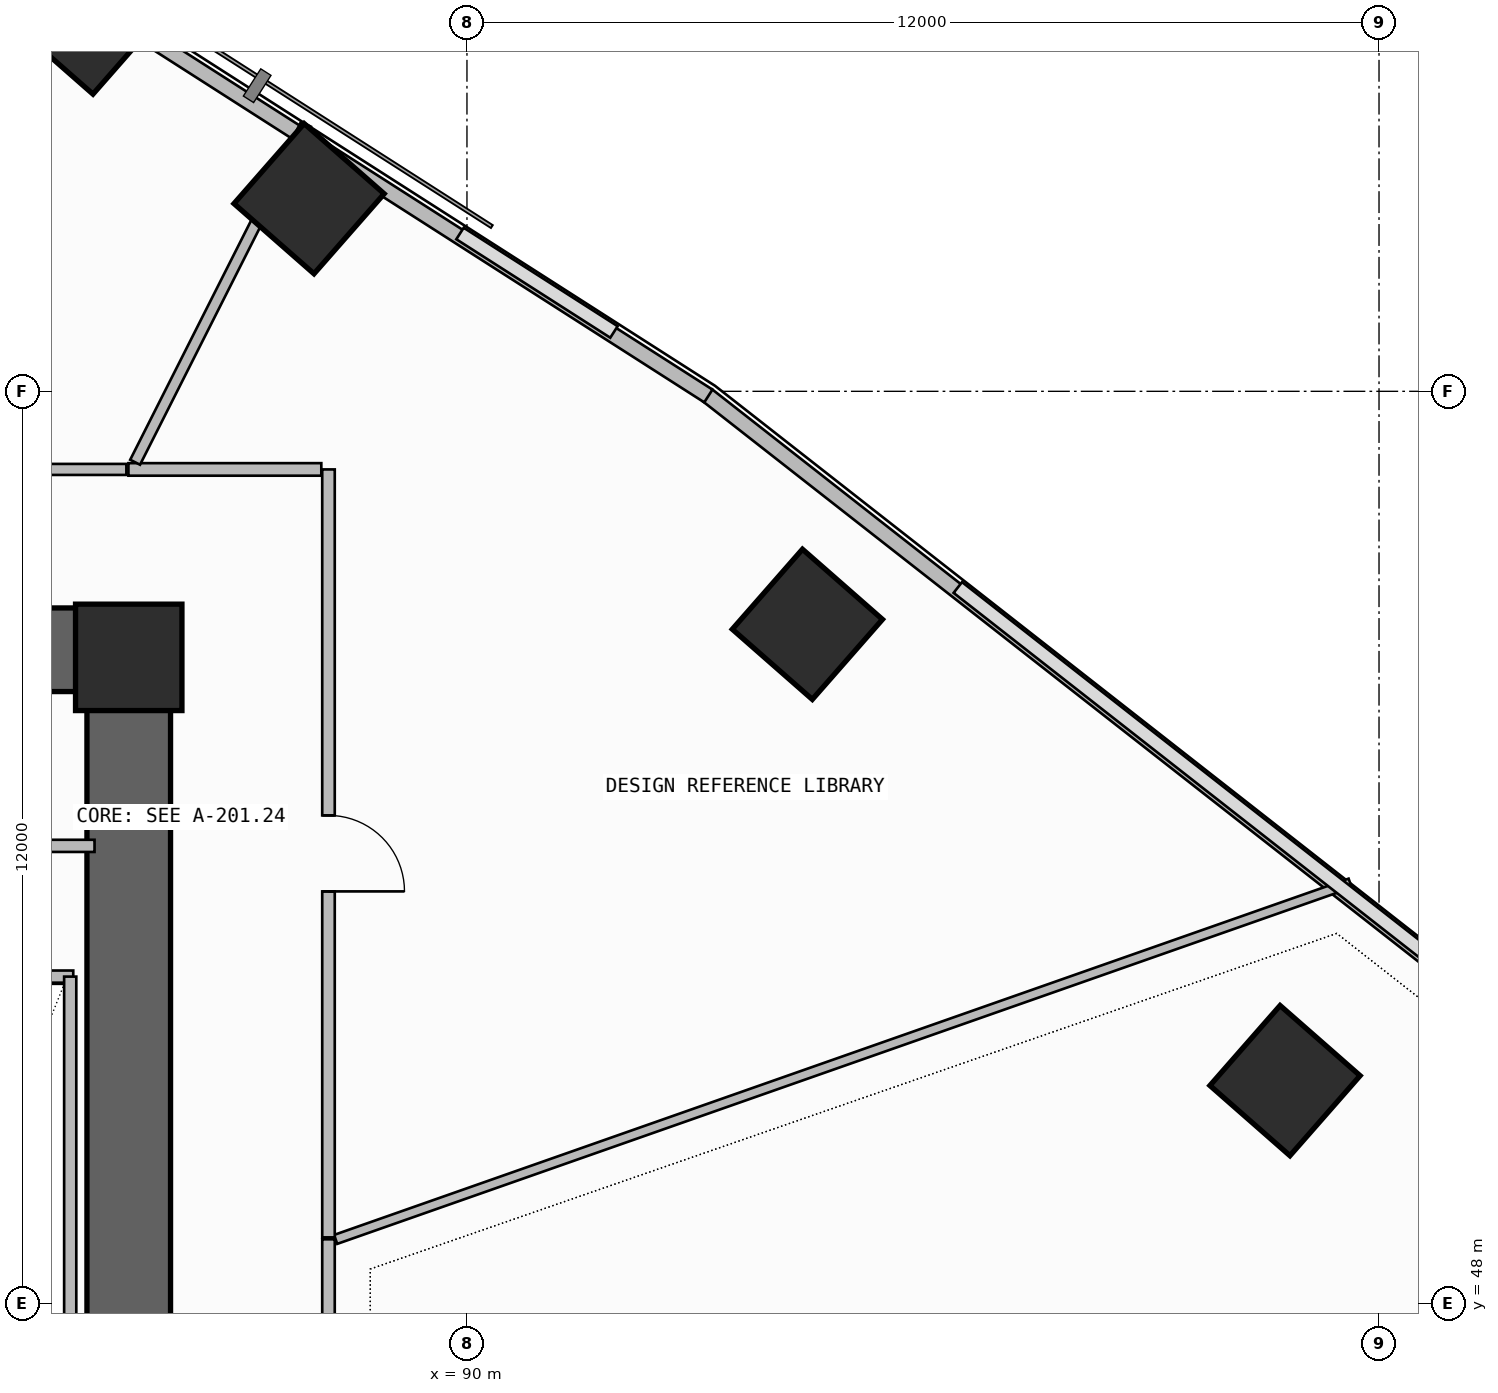
"""IFC4 building model, lengths in metres.
Left out: names, types, materials, properties, quantities, classifications, styles, units other than length and angle.
Written with IfcOpenShell. Run it as: python <this file> out.ifc"""

import sys

from ifc_helpers import new_model, si_unit, direction, frame, frame_2d, origin, origin_2d, place, context, subcontext, project, spatial, rectangle, extrude, element, fill, save


model = new_model("IFC4")
c1 = context("Model", 3, precision=1e-05, world=origin(), true_north=direction((0.0, 1.0)))
c2 = subcontext(c1, "Body", "Model", "MODEL_VIEW")
j1 = project(units=[si_unit("LENGTHUNIT", "METRE"), si_unit("PLANEANGLEUNIT", "RADIAN")], contexts=[c1])
p1 = place(None, origin())
s1 = spatial("IfcSite", under=j1, at=p1, CompositionType="ELEMENT")
p2 = place(p1, origin())
s2 = spatial("IfcBuilding", under=s1, at=p2, CompositionType="ELEMENT")
p3 = place(p2, frame((0.0, 0.0, 84.9)))
s3 = spatial("IfcBuildingStorey", under=s2, at=p3, CompositionType="ELEMENT", Elevation=84.9)
p4 = place(p3, frame((71.8, 56.6, -0.26), z_axis=(0.0, 0.0, 1.0), x_axis=(1.0, 0.0, 0.0)))
e1 = element("IfcWall", 1, at=p4, inside=s3, PredefinedType="SHEAR", context=c2, shape_type="SweptSolid", body=[
    extrude(rectangle(XDim=14.3, YDim=1.1, at=frame_2d((7.15, 0.0))), origin(), (0.0, 0.0, 1.0), 3.6),
])
p5 = place(p3, frame((85.55, 47.6, -0.26), z_axis=(0.0, 0.0, 1.0), x_axis=(0.0, 1.0, 0.0)))
e2 = element("IfcWall", 2, at=p5, inside=s3, PredefinedType="SHEAR", context=c2, shape_type="SweptSolid", body=[
    extrude(rectangle(XDim=8.45, YDim=1.1, at=frame_2d((4.225, 0.0))), origin(), (0.0, 0.0, 1.0), 3.6),
])
for number, where, z_axis, x_axis in (
    (3, (85.55, 56.5, 0.0), (0.0, 0.0, 1.0), (1.0, 0.0, 0.0)),
    (4, (100.763, 50.932, 0.0), (0.0, 0.0, 1.0), (0.659, 0.752, 0.0)),
    (5, (94.479, 56.935, 0.0), (0.0, 0.0, 1.0), (0.659, 0.752, 0.0)),
    (6, (87.923, 62.534, 0.0), (0.0, 0.0, 1.0), (0.659, 0.752, 0.0)),
    (7, (85.015, 64.898, 0.0), (0.0, 0.0, 1.0), (0.659, 0.752, 0.0)),
):
    element("IfcColumn", number, at=place(p3, frame(where, z_axis=z_axis, x_axis=x_axis)), inside=s3, PredefinedType="COLUMN", context=c2, shape_type="SweptSolid", body=[
        extrude(rectangle(XDim=1.4, YDim=1.4, at=origin_2d()), origin(), (0.0, 0.0, 1.0), 3.6),
    ])
p6 = place(p3, frame((121.476, 37.781, 0.0), z_axis=(0.0, 0.0, 1.0), x_axis=(-0.787385636484, 0.61646075257, 0.0)))
e8 = element("IfcWall", 8, at=p6, inside=s3, PredefinedType="PARAPET", context=c2, shape_type="SweptSolid", body=[
    extrude(rectangle(XDim=35.957, YDim=0.2, at=frame_2d((17.979, 0.0))), origin(), (0.0, 0.0, 1.0), 1.15),
])
p7 = place(p3, frame((93.176, 59.939, 0.0), z_axis=(0.0, 0.0, 1.0), x_axis=(-0.842413081081, 0.538832256666, 0.0)))
e9 = element("IfcWall", 9, at=p7, inside=s3, PredefinedType="PARAPET", context=c2, shape_type="SweptSolid", body=[
    extrude(rectangle(XDim=9.011, YDim=0.2, at=frame_2d((4.505, 0.0))), origin(), (0.0, 0.0, 1.0), 1.15),
])
p8 = place(p3, frame((80.6, 52.3, 0.0), z_axis=(0.0, 0.0, 1.0), x_axis=(1.0, 0.0, 0.0)))
e10 = element("IfcWall", 10, at=p8, inside=s3, PredefinedType="SOLIDWALL", context=c2, shape_type="SweptSolid", body=[
    extrude(rectangle(XDim=4.22, YDim=0.16, at=frame_2d((2.11, 0.0))), origin(), (0.0, 0.0, 1.0), 3.34),
])
p9 = place(p3, frame((84.78, 47.7, 0.0), z_axis=(0.0, 0.0, 1.0), x_axis=(0.0, 1.0, 0.0)))
e11 = element("IfcWall", 11, at=p9, inside=s3, PredefinedType="SOLIDWALL", context=c2, shape_type="SweptSolid", body=[
    extrude(rectangle(XDim=4.6, YDim=0.16, at=frame_2d((2.3, 0.0))), origin(), (0.0, 0.0, 1.0), 3.34),
])
p10 = place(p3, frame((73.02, 54.02, 0.0), z_axis=(0.0, 0.0, 1.0), x_axis=(1.0, 0.0, 0.0)))
e12 = element("IfcWall", 12, at=p10, inside=s3, PredefinedType="SOLIDWALL", context=c2, shape_type="SweptSolid", body=[
    extrude(rectangle(XDim=12.08, YDim=0.16, at=frame_2d((6.04, 0.0))), origin(), (0.0, 0.0, 1.0), 3.34),
])
p11 = place(p3, frame((88.178, 43.347, 0.0), z_axis=(0.0, 0.0, 1.0), x_axis=(0.0, 1.0, 0.0)))
e13 = element("IfcWall", 13, at=p11, inside=s3, PredefinedType="PARTITIONING", context=c2, shape_type="SweptSolid", body=[
    extrude(rectangle(XDim=5.497, YDim=0.165, at=frame_2d((2.748, 0.0))), origin(), (0.0, 0.0, 1.0), 2.725),
])
p12 = place(p11, frame((2.248, 0.0, 0.0)))
e14 = element("IfcOpeningElement", 14, at=p12, cuts=e13, PredefinedType="OPENING", context=c2, shape_type="SweptSolid", body=[
    extrude(rectangle(XDim=1.0, YDim=2.2, at=frame_2d((0.5, 1.1))), frame((0.0, 0.093, 0.0), z_axis=(0.0, -1.0, 0.0), x_axis=(1.0, 0.0, 0.0)), (0.0, 0.0, 1.0), 0.185),
])
p13 = place(p3, frame((88.273, 48.843, 0.0), z_axis=(0.0, 0.0, 1.0), x_axis=(0.943516431549, 0.331325736091, 0.0)))
e15 = element("IfcWall", 15, at=p13, inside=s3, PredefinedType="PARTITIONING", context=c2, shape_type="SweptSolid", body=[
    extrude(rectangle(XDim=14.147, YDim=0.125, at=frame_2d((7.073, 0.0))), origin(), (0.0, 0.0, 1.0), 2.725),
])
p14 = place(p3, frame((88.178, 48.869, 0.0), z_axis=(0.0, 0.0, 1.0), x_axis=(0.0, 1.0, 0.0)))
e16 = element("IfcWall", 16, at=p14, inside=s3, PredefinedType="PARTITIONING", context=c2, shape_type="SweptSolid", body=[
    extrude(rectangle(XDim=10.103, YDim=0.165, at=frame_2d((5.052, 0.0))), origin(), (0.0, 0.0, 1.0), 2.725),
])
p15 = place(p14, frame((4.552, 0.0, 0.0)))
e17 = element("IfcOpeningElement", 17, at=p15, cuts=e16, PredefinedType="OPENING", context=c2, shape_type="SweptSolid", body=[
    extrude(rectangle(XDim=1.0, YDim=2.2, at=frame_2d((0.5, 1.1))), frame((0.0, 0.093, 0.0), z_axis=(0.0, -1.0, 0.0), x_axis=(1.0, 0.0, 0.0)), (0.0, 0.0, 1.0), 0.185),
])
p16 = place(p3, frame((88.083, 58.972, 0.0), z_axis=(0.0, 0.0, 1.0), x_axis=(-1.0, 0.0, 0.0)))
e18 = element("IfcWall", 18, at=p16, inside=s3, PredefinedType="PARTITIONING", context=c2, shape_type="SweptSolid", body=[
    extrude(rectangle(XDim=2.538, YDim=0.165, at=frame_2d((1.269, 0.0))), origin(), (0.0, 0.0, 1.0), 2.725),
])
p17 = place(p3, frame((85.634, 59.067, 0.0), z_axis=(0.0, 0.0, 1.0), x_axis=(0.451108601362, 0.892469063765, 0.0)))
e19 = element("IfcWall", 19, at=p17, inside=s3, PredefinedType="PARTITIONING", context=c2, shape_type="SweptSolid", body=[
    extrude(rectangle(XDim=4.984, YDim=0.145, at=frame_2d((2.492, 0.0))), origin(), (0.0, 0.0, 1.0), 2.725),
])
p18 = place(p3, frame((85.519, 58.972, 0.0), z_axis=(0.0, 0.0, 1.0), x_axis=(-1.0, 0.0, 0.0)))
e20 = element("IfcWall", 20, at=p18, inside=s3, PredefinedType="PARTITIONING", context=c2, shape_type="SweptSolid", body=[
    extrude(rectangle(XDim=6.334, YDim=0.145, at=frame_2d((3.167, 0.0))), origin(), (0.0, 0.0, 1.0), 2.725),
])
p19 = place(p18, frame((2.717, 0.0, 0.0)))
e21 = element("IfcOpeningElement", 21, at=p19, cuts=e20, PredefinedType="OPENING", context=c2, shape_type="SweptSolid", body=[
    extrude(rectangle(XDim=0.9, YDim=2.1, at=frame_2d((0.45, 1.05))), frame((0.0, 0.083, 0.0), z_axis=(0.0, -1.0, 0.0), x_axis=(1.0, 0.0, 0.0)), (0.0, 0.0, 1.0), 0.165),
])
p20 = place(p15, frame((1.0, 0.0, 0.0), z_axis=(0.0, 0.0, 1.0), x_axis=(-1.0, 0.0, 0.0)))
e22 = element("IfcDoor", 22, at=p20, inside=s3, OperationType="SINGLE_SWING_RIGHT", PredefinedType="DOOR", context=c2, shape_type="SweptSolid", body=[
    extrude(rectangle(XDim=1.0, YDim=2.2, at=frame_2d((0.5, 1.1))), frame((0.0, 0.025, 0.0), z_axis=(0.0, -1.0, 0.0), x_axis=(1.0, 0.0, 0.0)), (0.0, 0.0, 1.0), 0.05),
])
fill(e17, e22)
save(model, sys.argv[1])
